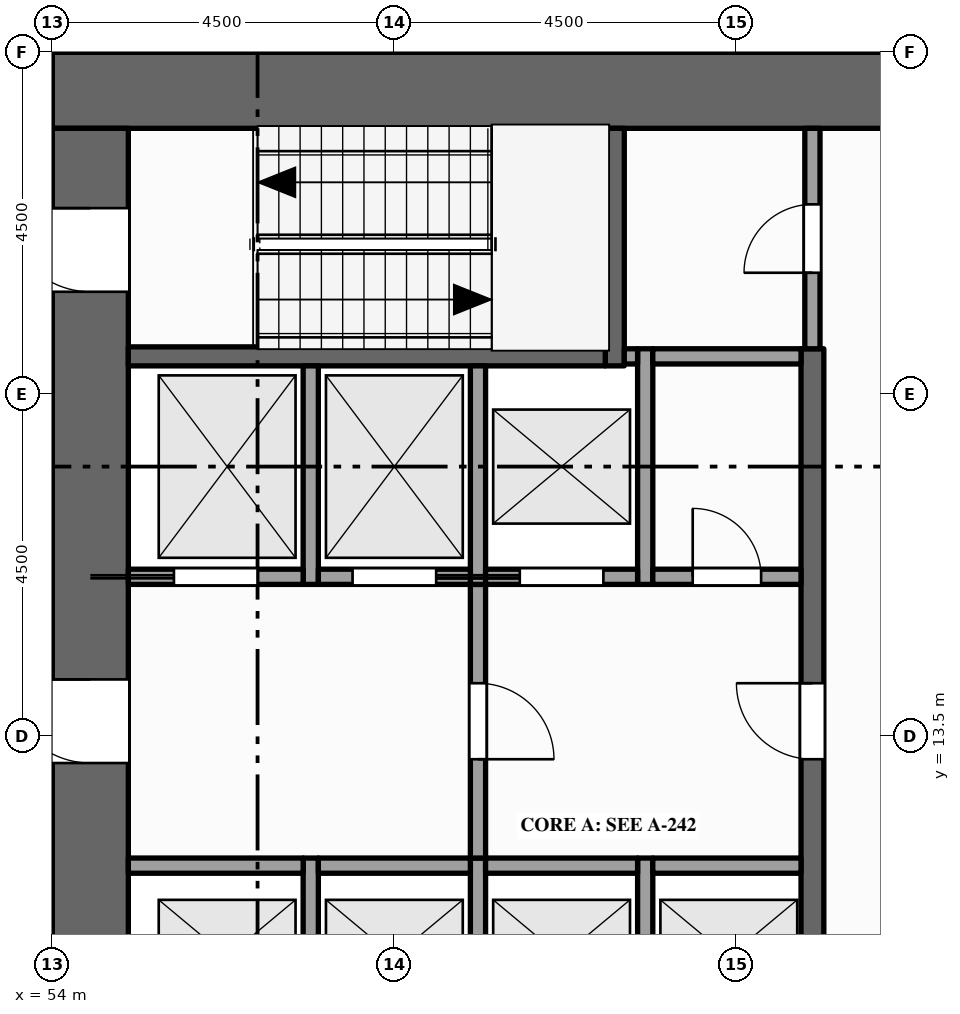
"""IFC4 building model, lengths in metres.
Left out: names, types, materials, properties, quantities, classifications, styles, units other than length and angle.
Written with IfcOpenShell. Run it as: python <this file> out.ifc"""

import sys

from ifc_helpers import new_model, si_unit, direction, frame, frame_2d, origin, place, context, subcontext, project, spatial, rectangle, extrude, element, fill, save


model = new_model("IFC4")
c1 = context("Model", 3, precision=1e-05, world=origin(), true_north=direction((0.0, 1.0)))
c2 = subcontext(c1, "Body", "Model", "MODEL_VIEW")
j1 = project(units=[si_unit("LENGTHUNIT", "METRE"), si_unit("PLANEANGLEUNIT", "RADIAN")], contexts=[c1])
p1 = place(None, origin())
s1 = spatial("IfcSite", under=j1, at=p1, CompositionType="ELEMENT")
p2 = place(p1, origin())
s2 = spatial("IfcBuilding", under=s1, at=p2, CompositionType="ELEMENT")
p3 = place(p2, frame((0.0, 0.0, 235.0)))
s3 = spatial("IfcBuildingStorey", under=s2, at=p3, CompositionType="ELEMENT", Elevation=235.0)
p4 = place(p3, frame((54.0, 22.0, -0.15), z_axis=(0.0, 0.0, 1.0), x_axis=(1.0, 0.0, 0.0)))
e1 = element("IfcWall", 1, at=p4, inside=s3, PredefinedType="SHEAR", context=c2, shape_type="SweptSolid", body=[
    extrude(rectangle(XDim=13.5, YDim=1.0, at=frame_2d((6.75, 0.0))), origin(), (0.0, 0.0, 1.0), 4.0),
])
p5 = place(p3, frame((54.5, 1.0, -0.15), z_axis=(0.0, 0.0, 1.0), x_axis=(0.0, 1.0, 0.0)))
e2 = element("IfcWall", 2, at=p5, inside=s3, PredefinedType="SHEAR", context=c2, shape_type="SweptSolid", body=[
    extrude(rectangle(XDim=20.5, YDim=1.0, at=frame_2d((10.25, 0.0))), origin(), (0.0, 0.0, 1.0), 4.0),
])
p6 = place(p5, frame((6.1, 0.0, 0.15)))
e3 = element("IfcOpeningElement", 3, at=p6, cuts=e2, PredefinedType="OPENING", context=c2, shape_type="SweptSolid", body=[
    extrude(rectangle(XDim=1.8, YDim=2.1, at=frame_2d((0.9, 1.05))), frame((0.0, 0.51, 0.0), z_axis=(0.0, -1.0, 0.0), x_axis=(1.0, 0.0, 0.0)), (0.0, 0.0, 1.0), 1.02),
])
p7 = place(p5, frame((12.15, 0.0, 0.15)))
e4 = element("IfcOpeningElement", 4, at=p7, cuts=e2, PredefinedType="OPENING", context=c2, shape_type="SweptSolid", body=[
    extrude(rectangle(XDim=1.1, YDim=2.1, at=frame_2d((0.55, 1.05))), frame((0.0, 0.51, 0.0), z_axis=(0.0, -1.0, 0.0), x_axis=(1.0, 0.0, 0.0)), (0.0, 0.0, 1.0), 1.02),
])
p8 = place(p5, frame((1.15, 0.0, 0.15)))
e5 = element("IfcOpeningElement", 5, at=p8, cuts=e2, PredefinedType="OPENING", context=c2, shape_type="SweptSolid", body=[
    extrude(rectangle(XDim=1.1, YDim=2.1, at=frame_2d((0.55, 1.05))), frame((0.0, 0.51, 0.0), z_axis=(0.0, -1.0, 0.0), x_axis=(1.0, 0.0, 0.0)), (0.0, 0.0, 1.0), 1.02),
])
p9 = place(p5, frame((18.35, 0.0, 0.15)))
e6 = element("IfcOpeningElement", 6, at=p9, cuts=e2, PredefinedType="OPENING", context=c2, shape_type="SweptSolid", body=[
    extrude(rectangle(XDim=1.1, YDim=2.1, at=frame_2d((0.55, 1.05))), frame((0.0, 0.51, 0.0), z_axis=(0.0, -1.0, 0.0), x_axis=(1.0, 0.0, 0.0)), (0.0, 0.0, 1.0), 1.02),
])
p10 = place(p3, frame((57.4, 9.3, 0.0), z_axis=(0.0, 0.0, 1.0), x_axis=(0.0, 1.0, 0.0)))
e7 = element("IfcWall", 7, at=p10, inside=s3, PredefinedType="SOLIDWALL", context=c2, shape_type="SweptSolid", body=[
    extrude(rectangle(XDim=2.6, YDim=0.2, at=frame_2d((1.3, 0.0))), origin(), (0.0, 0.0, 1.0), 3.85),
])
p11 = place(p3, frame((57.4, 15.5, 0.0), z_axis=(0.0, 0.0, 1.0), x_axis=(0.0, 1.0, 0.0)))
e8 = element("IfcWall", 8, at=p11, inside=s3, PredefinedType="SOLIDWALL", context=c2, shape_type="SweptSolid", body=[
    extrude(rectangle(XDim=2.875, YDim=0.2, at=frame_2d((1.438, 0.0))), origin(), (0.0, 0.0, 1.0), 3.85),
])
p12 = place(p3, frame((59.6, 9.3, 0.0), z_axis=(0.0, 0.0, 1.0), x_axis=(0.0, 1.0, 0.0)))
e9 = element("IfcWall", 9, at=p12, inside=s3, PredefinedType="SOLIDWALL", context=c2, shape_type="SweptSolid", body=[
    extrude(rectangle(XDim=2.6, YDim=0.2, at=frame_2d((1.3, 0.0))), origin(), (0.0, 0.0, 1.0), 3.85),
])
p13 = place(p3, frame((59.6, 11.9, 0.0), z_axis=(0.0, 0.0, 1.0), x_axis=(0.0, 1.0, 0.0)))
e10 = element("IfcWall", 10, at=p13, inside=s3, PredefinedType="PARTITIONING", context=c2, shape_type="SweptSolid", body=[
    extrude(rectangle(XDim=3.6, YDim=0.2, at=frame_2d((1.8, 0.0))), origin(), (0.0, 0.0, 1.0), 3.85),
])
p14 = place(p13, frame((1.3, 0.0, 0.0)))
e11 = element("IfcOpeningElement", 11, at=p14, cuts=e10, PredefinedType="OPENING", context=c2, shape_type="SweptSolid", body=[
    extrude(rectangle(XDim=1.0, YDim=2.1, at=frame_2d((0.5, 1.05))), frame((0.0, 0.11, 0.0), z_axis=(0.0, -1.0, 0.0), x_axis=(1.0, 0.0, 0.0)), (0.0, 0.0, 1.0), 0.22),
])
p15 = place(p3, frame((59.6, 15.5, 0.0), z_axis=(0.0, 0.0, 1.0), x_axis=(0.0, 1.0, 0.0)))
e12 = element("IfcWall", 12, at=p15, inside=s3, PredefinedType="SOLIDWALL", context=c2, shape_type="SweptSolid", body=[
    extrude(rectangle(XDim=2.875, YDim=0.2, at=frame_2d((1.438, 0.0))), origin(), (0.0, 0.0, 1.0), 3.85),
])
p16 = place(p3, frame((61.4, 18.375, 0.0), z_axis=(0.0, 0.0, 1.0), x_axis=(0.0, 1.0, 0.0)))
e13 = element("IfcWall", 13, at=p16, inside=s3, PredefinedType="SHEAR", context=c2, shape_type="SweptSolid", body=[
    extrude(rectangle(XDim=3.125, YDim=0.25, at=frame_2d((1.562, 0.0))), origin(), (0.0, 0.0, 1.0), 3.85),
])
p17 = place(p3, frame((61.8, 9.3, 0.0), z_axis=(0.0, 0.0, 1.0), x_axis=(0.0, 1.0, 0.0)))
e14 = element("IfcWall", 14, at=p17, inside=s3, PredefinedType="SOLIDWALL", context=c2, shape_type="SweptSolid", body=[
    extrude(rectangle(XDim=2.6, YDim=0.2, at=frame_2d((1.3, 0.0))), origin(), (0.0, 0.0, 1.0), 3.85),
])
p18 = place(p3, frame((61.8, 15.5, 0.0), z_axis=(0.0, 0.0, 1.0), x_axis=(0.0, 1.0, 0.0)))
e15 = element("IfcWall", 15, at=p18, inside=s3, PredefinedType="SOLIDWALL", context=c2, shape_type="SweptSolid", body=[
    extrude(rectangle(XDim=3.1, YDim=0.2, at=frame_2d((1.55, 0.0))), origin(), (0.0, 0.0, 1.0), 3.85),
])
p19 = place(p3, frame((64.0, 4.1, 0.0), z_axis=(0.0, 0.0, 1.0), x_axis=(0.0, 1.0, 0.0)))
e16 = element("IfcWall", 16, at=p19, inside=s3, PredefinedType="SHEAR", context=c2, shape_type="SweptSolid", body=[
    extrude(rectangle(XDim=14.5, YDim=0.3, at=frame_2d((7.25, 0.0))), origin(), (0.0, 0.0, 1.0), 3.85),
])
p20 = place(p19, frame((3.4, 0.0, 0.0)))
e17 = element("IfcOpeningElement", 17, at=p20, cuts=e16, PredefinedType="OPENING", context=c2, shape_type="SweptSolid", body=[
    extrude(rectangle(XDim=1.0, YDim=2.1, at=frame_2d((0.5, 1.05))), frame((0.0, 0.16, 0.0), z_axis=(0.0, -1.0, 0.0), x_axis=(1.0, 0.0, 0.0)), (0.0, 0.0, 1.0), 0.32),
])
p21 = place(p19, frame((9.1, 0.0, 0.0)))
e18 = element("IfcOpeningElement", 18, at=p21, cuts=e16, PredefinedType="OPENING", context=c2, shape_type="SweptSolid", body=[
    extrude(rectangle(XDim=1.0, YDim=2.1, at=frame_2d((0.5, 1.05))), frame((0.0, 0.16, 0.0), z_axis=(0.0, -1.0, 0.0), x_axis=(1.0, 0.0, 0.0)), (0.0, 0.0, 1.0), 0.32),
])
p22 = place(p3, frame((64.0, 18.6, 0.0), z_axis=(0.0, 0.0, 1.0), x_axis=(0.0, 1.0, 0.0)))
e19 = element("IfcWall", 19, at=p22, inside=s3, PredefinedType="PARTITIONING", context=c2, shape_type="SweptSolid", body=[
    extrude(rectangle(XDim=2.9, YDim=0.2, at=frame_2d((1.45, 0.0))), origin(), (0.0, 0.0, 1.0), 3.85),
])
p23 = place(p22, frame((1.0, 0.0, 0.0)))
e20 = element("IfcOpeningElement", 20, at=p23, cuts=e19, PredefinedType="OPENING", context=c2, shape_type="SweptSolid", body=[
    extrude(rectangle(XDim=0.9, YDim=2.1, at=frame_2d((0.45, 1.05))), frame((0.0, 0.11, 0.0), z_axis=(0.0, -1.0, 0.0), x_axis=(1.0, 0.0, 0.0)), (0.0, 0.0, 1.0), 0.22),
])
p24 = place(p3, frame((55.0, 11.8, 0.0), z_axis=(0.0, 0.0, 1.0), x_axis=(1.0, 0.0, 0.0)))
e21 = element("IfcWall", 21, at=p24, inside=s3, PredefinedType="SOLIDWALL", context=c2, shape_type="SweptSolid", body=[
    extrude(rectangle(XDim=2.3, YDim=0.2, at=frame_2d((1.15, 0.0))), origin(), (0.0, 0.0, 1.0), 3.85),
])
for number, where, z_axis, x_axis in (
    (22, (57.5, 11.8, 0.0), (0.0, 0.0, 1.0), (1.0, 0.0, 0.0)),
    (23, (59.7, 11.8, 0.0), (0.0, 0.0, 1.0), (1.0, 0.0, 0.0)),
):
    element("IfcWall", number, at=place(p3, frame(where, z_axis=z_axis, x_axis=x_axis)), inside=s3, PredefinedType="SOLIDWALL", context=c2, shape_type="SweptSolid", body=[
        extrude(rectangle(XDim=2.0, YDim=0.2, at=frame_2d((1.0, 0.0))), origin(), (0.0, 0.0, 1.0), 3.85),
    ])
p25 = place(p3, frame((61.9, 11.8, 0.0), z_axis=(0.0, 0.0, 1.0), x_axis=(1.0, 0.0, 0.0)))
e24 = element("IfcWall", 24, at=p25, inside=s3, PredefinedType="SOLIDWALL", context=c2, shape_type="SweptSolid", body=[
    extrude(rectangle(XDim=1.95, YDim=0.2, at=frame_2d((0.975, 0.0))), origin(), (0.0, 0.0, 1.0), 3.85),
])
p26 = place(p3, frame((55.0, 15.6, 0.0), z_axis=(0.0, 0.0, 1.0), x_axis=(1.0, 0.0, 0.0)))
e25 = element("IfcWall", 25, at=p26, inside=s3, PredefinedType="SOLIDWALL", context=c2, shape_type="SweptSolid", body=[
    extrude(rectangle(XDim=2.3, YDim=0.2, at=frame_2d((1.15, 0.0))), origin(), (0.0, 0.0, 1.0), 3.85),
])
p27 = place(p26, frame((0.6, 0.0, 0.012)))
e26 = element("IfcOpeningElement", 26, at=p27, cuts=e25, PredefinedType="OPENING", context=c2, shape_type="SweptSolid", body=[
    extrude(rectangle(XDim=1.1, YDim=2.1, at=frame_2d((0.55, 1.05))), frame((0.0, 0.11, 0.0), z_axis=(0.0, -1.0, 0.0), x_axis=(1.0, 0.0, 0.0)), (0.0, 0.0, 1.0), 0.22),
])
p28 = place(p3, frame((57.5, 15.6, 0.0), z_axis=(0.0, 0.0, 1.0), x_axis=(1.0, 0.0, 0.0)))
e27 = element("IfcWall", 27, at=p28, inside=s3, PredefinedType="SOLIDWALL", context=c2, shape_type="SweptSolid", body=[
    extrude(rectangle(XDim=2.0, YDim=0.2, at=frame_2d((1.0, 0.0))), origin(), (0.0, 0.0, 1.0), 3.85),
])
p29 = place(p28, frame((0.45, 0.0, 0.012)))
e28 = element("IfcOpeningElement", 28, at=p29, cuts=e27, PredefinedType="OPENING", context=c2, shape_type="SweptSolid", body=[
    extrude(rectangle(XDim=1.1, YDim=2.1, at=frame_2d((0.55, 1.05))), frame((0.0, 0.11, 0.0), z_axis=(0.0, -1.0, 0.0), x_axis=(1.0, 0.0, 0.0)), (0.0, 0.0, 1.0), 0.22),
])
p30 = place(p3, frame((59.7, 15.6, 0.0), z_axis=(0.0, 0.0, 1.0), x_axis=(1.0, 0.0, 0.0)))
e29 = element("IfcWall", 29, at=p30, inside=s3, PredefinedType="SOLIDWALL", context=c2, shape_type="SweptSolid", body=[
    extrude(rectangle(XDim=2.0, YDim=0.2, at=frame_2d((1.0, 0.0))), origin(), (0.0, 0.0, 1.0), 3.85),
])
p31 = place(p30, frame((0.45, 0.0, 0.012)))
e30 = element("IfcOpeningElement", 30, at=p31, cuts=e29, PredefinedType="OPENING", context=c2, shape_type="SweptSolid", body=[
    extrude(rectangle(XDim=1.1, YDim=2.1, at=frame_2d((0.55, 1.05))), frame((0.0, 0.11, 0.0), z_axis=(0.0, -1.0, 0.0), x_axis=(1.0, 0.0, 0.0)), (0.0, 0.0, 1.0), 0.22),
])
p32 = place(p3, frame((61.9, 15.6, 0.0), z_axis=(0.0, 0.0, 1.0), x_axis=(1.0, 0.0, 0.0)))
e31 = element("IfcWall", 31, at=p32, inside=s3, PredefinedType="PARTITIONING", context=c2, shape_type="SweptSolid", body=[
    extrude(rectangle(XDim=1.95, YDim=0.2, at=frame_2d((0.975, 0.0))), origin(), (0.0, 0.0, 1.0), 3.85),
])
p33 = place(p32, frame((0.525, 0.0, 0.0)))
e32 = element("IfcOpeningElement", 32, at=p33, cuts=e31, PredefinedType="OPENING", context=c2, shape_type="SweptSolid", body=[
    extrude(rectangle(XDim=0.9, YDim=2.1, at=frame_2d((0.45, 1.05))), frame((0.0, 0.11, 0.0), z_axis=(0.0, -1.0, 0.0), x_axis=(1.0, 0.0, 0.0)), (0.0, 0.0, 1.0), 0.22),
])
p34 = place(p3, frame((55.0, 18.5, 0.0), z_axis=(0.0, 0.0, 1.0), x_axis=(1.0, 0.0, 0.0)))
e33 = element("IfcWall", 33, at=p34, inside=s3, PredefinedType="SHEAR", context=c2, shape_type="SweptSolid", body=[
    extrude(rectangle(XDim=6.275, YDim=0.25, at=frame_2d((3.137, 0.0))), origin(), (0.0, 0.0, 1.0), 3.85),
])
p35 = place(p3, frame((61.525, 18.5, 0.0), z_axis=(0.0, 0.0, 1.0), x_axis=(1.0, 0.0, 0.0)))
e34 = element("IfcWall", 34, at=p35, inside=s3, PredefinedType="SOLIDWALL", context=c2, shape_type="SweptSolid", body=[
    extrude(rectangle(XDim=0.175, YDim=0.2, at=frame_2d((0.087, 0.0))), origin(), (0.0, 0.0, 1.0), 3.85),
])
p36 = place(p3, frame((61.9, 18.5, 0.0), z_axis=(0.0, 0.0, 1.0), x_axis=(1.0, 0.0, 0.0)))
e35 = element("IfcWall", 35, at=p36, inside=s3, PredefinedType="PARTITIONING", context=c2, shape_type="SweptSolid", body=[
    extrude(rectangle(XDim=1.95, YDim=0.2, at=frame_2d((0.975, 0.0))), origin(), (0.0, 0.0, 1.0), 3.85),
])
p37 = place(p27, origin())
e36 = element("IfcDoor", 36, at=p37, inside=s3, OperationType="SLIDING_TO_LEFT", PredefinedType="DOOR", context=c2, shape_type="SweptSolid", body=[
    extrude(rectangle(XDim=1.1, YDim=2.1, at=frame_2d((0.55, 1.05))), frame((0.0, 0.025, 0.0), z_axis=(0.0, -1.0, 0.0), x_axis=(1.0, 0.0, 0.0)), (0.0, 0.0, 1.0), 0.05),
])
fill(e26, e36)
p38 = place(p29, origin())
e37 = element("IfcDoor", 37, at=p38, inside=s3, OperationType="SLIDING_TO_RIGHT", PredefinedType="DOOR", context=c2, shape_type="SweptSolid", body=[
    extrude(rectangle(XDim=1.1, YDim=2.1, at=frame_2d((0.55, 1.05))), frame((0.0, 0.025, 0.0), z_axis=(0.0, -1.0, 0.0), x_axis=(1.0, 0.0, 0.0)), (0.0, 0.0, 1.0), 0.05),
])
fill(e28, e37)
p39 = place(p31, origin())
e38 = element("IfcDoor", 38, at=p39, inside=s3, OperationType="SLIDING_TO_LEFT", PredefinedType="DOOR", context=c2, shape_type="SweptSolid", body=[
    extrude(rectangle(XDim=1.1, YDim=2.1, at=frame_2d((0.55, 1.05))), frame((0.0, 0.025, 0.0), z_axis=(0.0, -1.0, 0.0), x_axis=(1.0, 0.0, 0.0)), (0.0, 0.0, 1.0), 0.05),
])
fill(e30, e38)
p40 = place(p7, origin())
e39 = element("IfcDoor", 39, at=p40, inside=s3, OperationType="SINGLE_SWING_RIGHT", PredefinedType="DOOR", context=c2, shape_type="SweptSolid", body=[
    extrude(rectangle(XDim=1.1, YDim=2.1, at=frame_2d((0.55, 1.05))), frame((0.0, 0.025, 0.0), z_axis=(0.0, -1.0, 0.0), x_axis=(1.0, 0.0, 0.0)), (0.0, 0.0, 1.0), 0.05),
])
fill(e4, e39)
p41 = place(p14, origin())
e40 = element("IfcDoor", 40, at=p41, inside=s3, OperationType="SINGLE_SWING_LEFT", PredefinedType="DOOR", context=c2, shape_type="SweptSolid", body=[
    extrude(rectangle(XDim=1.0, YDim=2.1, at=frame_2d((0.5, 1.05))), frame((0.0, 0.025, 0.0), z_axis=(0.0, -1.0, 0.0), x_axis=(1.0, 0.0, 0.0)), (0.0, 0.0, 1.0), 0.05),
])
fill(e11, e40)
p42 = place(p21, origin())
e41 = element("IfcDoor", 41, at=p42, inside=s3, OperationType="SINGLE_SWING_RIGHT", PredefinedType="DOOR", context=c2, shape_type="SweptSolid", body=[
    extrude(rectangle(XDim=1.0, YDim=2.1, at=frame_2d((0.5, 1.05))), frame((0.0, 0.025, 0.0), z_axis=(0.0, -1.0, 0.0), x_axis=(1.0, 0.0, 0.0)), (0.0, 0.0, 1.0), 0.05),
])
fill(e18, e41)
p43 = place(p9, origin())
e42 = element("IfcDoor", 42, at=p43, inside=s3, OperationType="SINGLE_SWING_RIGHT", PredefinedType="DOOR", context=c2, shape_type="SweptSolid", body=[
    extrude(rectangle(XDim=1.1, YDim=2.1, at=frame_2d((0.55, 1.05))), frame((0.0, 0.025, 0.0), z_axis=(0.0, -1.0, 0.0), x_axis=(1.0, 0.0, 0.0)), (0.0, 0.0, 1.0), 0.05),
])
fill(e6, e42)
p44 = place(p23, origin())
e43 = element("IfcDoor", 43, at=p44, inside=s3, OperationType="SINGLE_SWING_LEFT", PredefinedType="DOOR", context=c2, shape_type="SweptSolid", body=[
    extrude(rectangle(XDim=0.9, YDim=2.1, at=frame_2d((0.45, 1.05))), frame((0.0, 0.025, 0.0), z_axis=(0.0, -1.0, 0.0), x_axis=(1.0, 0.0, 0.0)), (0.0, 0.0, 1.0), 0.05),
])
fill(e20, e43)
p45 = place(p33, origin())
e44 = element("IfcDoor", 44, at=p45, inside=s3, OperationType="SINGLE_SWING_LEFT", PredefinedType="DOOR", context=c2, shape_type="SweptSolid", body=[
    extrude(rectangle(XDim=0.9, YDim=2.1, at=frame_2d((0.45, 1.05))), frame((0.0, 0.025, 0.0), z_axis=(0.0, -1.0, 0.0), x_axis=(1.0, 0.0, 0.0)), (0.0, 0.0, 1.0), 0.05),
])
fill(e32, e44)
save(model, sys.argv[1])
